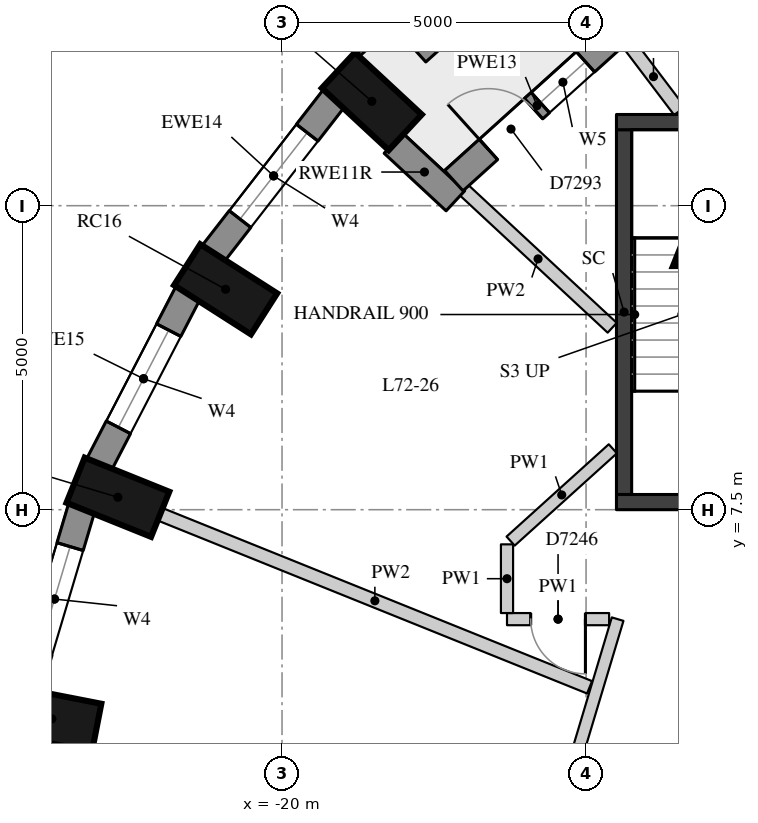
"""IFC4 building model, lengths in metres.
Left out: names, types, materials, properties, quantities, classifications, styles, units other than length and angle.
Written with IfcOpenShell. Run it as: python <this file> out.ifc"""

import sys

from ifc_helpers import new_model, si_unit, direction, frame, frame_2d, origin, origin_2d, place, context, subcontext, project, spatial, rectangle, extrude, element, fill, save


model = new_model("IFC4")
c1 = context("Model", 3, precision=1e-05, world=origin(), true_north=direction((0.0, 1.0)))
c2 = subcontext(c1, "Body", "Model", "MODEL_VIEW")
j1 = project(units=[si_unit("LENGTHUNIT", "METRE"), si_unit("PLANEANGLEUNIT", "RADIAN")], contexts=[c1])
p1 = place(None, origin())
s1 = spatial("IfcSite", under=j1, at=p1, CompositionType="ELEMENT")
p2 = place(p1, origin())
s2 = spatial("IfcBuilding", under=s1, at=p2, CompositionType="ELEMENT")
p3 = place(p2, frame((0.0, 0.0, 253.1)))
s3 = spatial("IfcBuildingStorey", under=s2, at=p3, CompositionType="ELEMENT", Elevation=253.1)
for number, where, z_axis, x_axis in (
    (1, (-18.523, 14.216, 0.0), (0.0, 0.0, 1.0), (-0.733, 0.681, 0.0)),
    (2, (-20.928, 11.125, 0.0), (0.0, 0.0, 1.0), (-0.843, 0.539, 0.0)),
    (3, (-22.7, 7.705, 0.0), (0.0, 0.0, 1.0), (-0.928, 0.374, 0.0)),
    (4, (-23.785, 4.06, 0.0), (0.0, 0.0, 1.0), (-0.981, 0.192, 0.0)),
):
    element("IfcColumn", number, at=place(p3, frame(where, z_axis=z_axis, x_axis=x_axis)), inside=s3, PredefinedType="COLUMN", context=c2, shape_type="SweptSolid", body=[
        extrude(rectangle(XDim=1.5, YDim=0.8, at=origin_2d()), origin(), (0.0, 0.0, 1.0), 3.3),
    ])
p4 = place(p3, frame((-19.142, 14.272, 0.0), z_axis=(0.0, 0.0, 1.0), x_axis=(-0.613862536705, -0.789412937587, 0.0)))
e5 = element("IfcWall", 5, at=p4, inside=s3, PredefinedType="SOLIDWALL", context=c2, shape_type="SweptSolid", body=[
    extrude(rectangle(XDim=3.247, YDim=0.45, at=frame_2d((1.624, 0.0))), origin(), (0.0, 0.0, 1.0), 3.02),
])
p5 = place(p4, frame((0.724, 0.0, 0.4)))
e6 = element("IfcOpeningElement", 6, at=p5, cuts=e5, PredefinedType="OPENING", context=c2, shape_type="SweptSolid", body=[
    extrude(rectangle(XDim=1.8, YDim=1.75, at=frame_2d((0.9, 0.875))), frame((0.0, 0.235, 0.0), z_axis=(0.0, -1.0, 0.0), x_axis=(1.0, 0.0, 0.0)), (0.0, 0.0, 1.0), 0.47),
])
p6 = place(p3, frame((-21.545, 11.068, 0.0), z_axis=(0.0, 0.0, 1.0), x_axis=(-0.459889857669, -0.887975967475, 0.0)))
e7 = element("IfcWall", 7, at=p6, inside=s3, PredefinedType="SOLIDWALL", context=c2, shape_type="SweptSolid", body=[
    extrude(rectangle(XDim=3.186, YDim=0.45, at=frame_2d((1.593, 0.0))), origin(), (0.0, 0.0, 1.0), 3.02),
])
p7 = place(p6, frame((0.693, 0.0, 0.4)))
e8 = element("IfcOpeningElement", 8, at=p7, cuts=e7, PredefinedType="OPENING", context=c2, shape_type="SweptSolid", body=[
    extrude(rectangle(XDim=1.8, YDim=1.75, at=frame_2d((0.9, 0.875))), frame((0.0, 0.235, 0.0), z_axis=(0.0, -1.0, 0.0), x_axis=(1.0, 0.0, 0.0)), (0.0, 0.0, 1.0), 0.47),
])
p8 = place(p3, frame((-23.294, 7.535, 0.0), z_axis=(0.0, 0.0, 1.0), x_axis=(-0.285263800865, -0.958449040855, 0.0)))
e9 = element("IfcWall", 9, at=p8, inside=s3, PredefinedType="SOLIDWALL", context=c2, shape_type="SweptSolid", body=[
    extrude(rectangle(XDim=3.139, YDim=0.45, at=frame_2d((1.57, 0.0))), origin(), (0.0, 0.0, 1.0), 3.02),
])
p9 = place(p8, frame((0.67, 0.0, 0.4)))
e10 = element("IfcOpeningElement", 10, at=p9, cuts=e9, PredefinedType="OPENING", context=c2, shape_type="SweptSolid", body=[
    extrude(rectangle(XDim=1.8, YDim=1.75, at=frame_2d((0.9, 0.875))), frame((0.0, 0.235, 0.0), z_axis=(0.0, -1.0, 0.0), x_axis=(1.0, 0.0, 0.0)), (0.0, 0.0, 1.0), 0.47),
])
p10 = place(p3, frame((-18.167, 13.527, 0.0), z_axis=(0.0, 0.0, 1.0), x_axis=(0.732693451389, -0.680558819127, 0.0)))
e11 = element("IfcWall", 11, at=p10, inside=s3, PredefinedType="SOLIDWALL", context=c2, shape_type="SweptSolid", body=[
    extrude(rectangle(XDim=1.391, YDim=0.45, at=frame_2d((0.695, 0.0))), origin(), (0.0, 0.0, 1.0), 3.02),
])
p11 = place(p3, frame((-14.441, 15.38, 0.0), z_axis=(0.0, 0.0, 1.0), x_axis=(-0.742152631569, -0.670230909057, 0.0)))
e12 = element("IfcWall", 12, at=p11, inside=s3, PredefinedType="SOLIDWALL", context=c2, shape_type="SweptSolid", body=[
    extrude(rectangle(XDim=3.683, YDim=0.45, at=frame_2d((1.842, 0.0))), origin(), (0.0, 0.0, 1.0), 3.02),
])
p12 = place(p11, frame((0.767, 0.0, 0.4)))
e13 = element("IfcOpeningElement", 13, at=p12, cuts=e12, PredefinedType="OPENING", context=c2, shape_type="SweptSolid", body=[
    extrude(rectangle(XDim=1.0, YDim=1.75, at=frame_2d((0.5, 0.875))), frame((0.0, 0.235, 0.0), z_axis=(0.0, -1.0, 0.0), x_axis=(1.0, 0.0, 0.0)), (0.0, 0.0, 1.0), 0.47),
])
p13 = place(p11, frame((1.917, 0.0, 0.0)))
e14 = element("IfcOpeningElement", 14, at=p13, cuts=e12, PredefinedType="OPENING", context=c2, shape_type="SweptSolid", body=[
    extrude(rectangle(XDim=1.0, YDim=2.15, at=frame_2d((0.5, 1.075))), frame((0.0, 0.235, 0.0), z_axis=(0.0, -1.0, 0.0), x_axis=(1.0, 0.0, 0.0)), (0.0, 0.0, 1.0), 0.47),
])
p14 = place(p3, frame((-16.532, 16.328, 0.0), z_axis=(0.0, 0.0, 1.0), x_axis=(-0.743098542319, -0.669182005439, 0.0)))
e15 = element("IfcWall", 15, at=p14, inside=s3, PredefinedType="USERDEFINED", context=c2, shape_type="SweptSolid", body=[
    extrude(rectangle(XDim=1.8, YDim=0.7, at=frame_2d((0.9, 0.0))), origin(), (0.0, 0.0, 1.0), 0.75),
])
p15 = place(p3, frame((-14.375, 7.75, -0.28), z_axis=(0.0, 0.0, 1.0), x_axis=(0.0, 1.0, 0.0)))
e16 = element("IfcWall", 16, at=p15, inside=s3, PredefinedType="SHEAR", context=c2, shape_type="SweptSolid", body=[
    extrude(rectangle(XDim=6.0, YDim=0.25, at=frame_2d((3.0, 0.0))), origin(), (0.0, 0.0, 1.0), 3.3),
])
for number, where, z_axis, x_axis in (
    (17, (-14.5, 13.875, -0.28), (0.0, 0.0, 1.0), (1.0, 0.0, 0.0)),
    (18, (-14.5, 7.625, -0.28), (0.0, 0.0, 1.0), (1.0, 0.0, 0.0)),
):
    element("IfcWall", number, at=place(p3, frame(where, z_axis=z_axis, x_axis=x_axis)), inside=s3, PredefinedType="SHEAR", context=c2, shape_type="SweptSolid", body=[
        extrude(rectangle(XDim=5.2, YDim=0.25, at=frame_2d((2.6, 0.0))), origin(), (0.0, 0.0, 1.0), 3.3),
    ])
p16 = place(p3, frame((-16.071, 0.395, 0.0), z_axis=(0.0, 0.0, 1.0), x_axis=(0.287129472402, 0.957891782029, 0.0)))
e19 = element("IfcWall", 19, at=p16, inside=s3, PredefinedType="PARTITIONING", context=c2, shape_type="SweptSolid", body=[
    extrude(rectangle(XDim=5.538, YDim=0.2, at=frame_2d((2.769, 0.0))), origin(), (0.0, 0.0, 1.0), 2.52),
])
p17 = place(p16, frame((0.543, 0.0, 0.0)))
e20 = element("IfcOpeningElement", 20, at=p17, cuts=e19, PredefinedType="OPENING", context=c2, shape_type="SweptSolid", body=[
    extrude(rectangle(XDim=1.1, YDim=2.1, at=frame_2d((0.55, 1.05))), frame((0.0, 0.11, 0.0), z_axis=(0.0, -1.0, 0.0), x_axis=(1.0, 0.0, 0.0)), (0.0, 0.0, 1.0), 0.22),
])
p18 = place(p3, frame((-14.621, 5.7, 0.0), z_axis=(0.0, 0.0, 1.0), x_axis=(-1.0, 0.0, 0.0)))
e21 = element("IfcWall", 21, at=p18, inside=s3, PredefinedType="PARTITIONING", context=c2, shape_type="SweptSolid", body=[
    extrude(rectangle(XDim=1.679, YDim=0.2, at=frame_2d((0.84, 0.0))), origin(), (0.0, 0.0, 1.0), 3.02),
])
p19 = place(p18, frame((0.39, 0.0, 0.0)))
e22 = element("IfcOpeningElement", 22, at=p19, cuts=e21, PredefinedType="OPENING", context=c2, shape_type="SweptSolid", body=[
    extrude(rectangle(XDim=0.9, YDim=2.1, at=frame_2d((0.45, 1.05))), frame((0.0, 0.11, 0.0), z_axis=(0.0, -1.0, 0.0), x_axis=(1.0, 0.0, 0.0)), (0.0, 0.0, 1.0), 0.22),
])
p20 = place(p3, frame((-16.3, 5.8, 0.0), z_axis=(0.0, 0.0, 1.0), x_axis=(0.0, 1.0, 0.0)))
e23 = element("IfcWall", 23, at=p20, inside=s3, PredefinedType="PARTITIONING", context=c2, shape_type="SweptSolid", body=[
    extrude(rectangle(XDim=1.13, YDim=0.2, at=frame_2d((0.565, 0.0))), origin(), (0.0, 0.0, 1.0), 3.02),
])
p21 = place(p3, frame((-16.24, 6.984, 0.0), z_axis=(0.0, 0.0, 1.0), x_axis=(0.742140692687, 0.67024412885, 0.0)))
e24 = element("IfcWall", 24, at=p21, inside=s3, PredefinedType="PARTITIONING", context=c2, shape_type="SweptSolid", body=[
    extrude(rectangle(XDim=2.265, YDim=0.2, at=frame_2d((1.132, 0.0))), origin(), (0.0, 0.0, 1.0), 3.02),
])
p22 = place(p3, frame((-14.319, 15.187, 0.0), z_axis=(0.0, 0.0, 1.0), x_axis=(0.603937349714, -0.797031792101, 0.0)))
e25 = element("IfcWall", 25, at=p22, inside=s3, PredefinedType="PARTITIONING", context=c2, shape_type="SweptSolid", body=[
    extrude(rectangle(XDim=1.416, YDim=0.22, at=frame_2d((0.708, 0.0))), origin(), (0.0, 0.0, 1.0), 2.57),
])
p23 = place(p3, frame((-17.009, 12.758, 0.0), z_axis=(0.0, 0.0, 1.0), x_axis=(0.732631495403, -0.680625515202, 0.0)))
e26 = element("IfcWall", 26, at=p23, inside=s3, PredefinedType="PARTITIONING", context=c2, shape_type="SweptSolid", body=[
    extrude(rectangle(XDim=3.328, YDim=0.22, at=frame_2d((1.664, 0.0))), origin(), (0.0, 0.0, 1.0), 3.02),
])
p24 = place(p3, frame((-22.004, 7.424, 0.0), z_axis=(0.0, 0.0, 1.0), x_axis=(0.927533826991, -0.373739213607, 0.0)))
e27 = element("IfcWall", 27, at=p24, inside=s3, PredefinedType="PARTITIONING", context=c2, shape_type="SweptSolid", body=[
    extrude(rectangle(XDim=7.614, YDim=0.22, at=frame_2d((3.807, 0.0))), origin(), (0.0, 0.0, 1.0), 3.02),
])
p25 = place(p3, frame((-13.554, 0.0, 0.0), z_axis=(0.0, 0.0, 1.0), x_axis=(0.382730523909, 0.923860025149, 0.0)))
e28 = element("IfcWall", 28, at=p25, inside=s3, PredefinedType="PARTITIONING", context=c2, shape_type="SweptSolid", body=[
    extrude(rectangle(XDim=4.251, YDim=0.1, at=frame_2d((2.125, 0.0))), origin(), (0.0, 0.0, 1.0), 3.02),
])
p26 = place(p5, origin())
e29 = element("IfcWindow", 29, at=p26, inside=s3, PartitioningType="SINGLE_PANEL", PredefinedType="WINDOW", context=c2, shape_type="SweptSolid", body=[
    extrude(rectangle(XDim=1.8, YDim=1.75, at=frame_2d((0.9, 0.875))), frame((0.0, 0.035, 0.0), z_axis=(0.0, -1.0, 0.0), x_axis=(1.0, 0.0, 0.0)), (0.0, 0.0, 1.0), 0.06),
])
fill(e6, e29)
p27 = place(p7, origin())
e30 = element("IfcWindow", 30, at=p27, inside=s3, PartitioningType="SINGLE_PANEL", PredefinedType="WINDOW", context=c2, shape_type="SweptSolid", body=[
    extrude(rectangle(XDim=1.8, YDim=1.75, at=frame_2d((0.9, 0.875))), frame((0.0, 0.035, 0.0), z_axis=(0.0, -1.0, 0.0), x_axis=(1.0, 0.0, 0.0)), (0.0, 0.0, 1.0), 0.06),
])
fill(e8, e30)
p28 = place(p9, origin())
e31 = element("IfcWindow", 31, at=p28, inside=s3, PartitioningType="SINGLE_PANEL", PredefinedType="WINDOW", context=c2, shape_type="SweptSolid", body=[
    extrude(rectangle(XDim=1.8, YDim=1.75, at=frame_2d((0.9, 0.875))), frame((0.0, 0.035, 0.0), z_axis=(0.0, -1.0, 0.0), x_axis=(1.0, 0.0, 0.0)), (0.0, 0.0, 1.0), 0.06),
])
fill(e10, e31)
p29 = place(p12, origin())
e32 = element("IfcWindow", 32, at=p29, inside=s3, PartitioningType="SINGLE_PANEL", PredefinedType="WINDOW", context=c2, shape_type="SweptSolid", body=[
    extrude(rectangle(XDim=1.0, YDim=1.75, at=frame_2d((0.5, 0.875))), frame((0.0, 0.035, 0.0), z_axis=(0.0, -1.0, 0.0), x_axis=(1.0, 0.0, 0.0)), (0.0, 0.0, 1.0), 0.06),
])
fill(e13, e32)
p30 = place(p13, origin())
e33 = element("IfcDoor", 33, at=p30, inside=s3, OperationType="SINGLE_SWING_LEFT", PredefinedType="DOOR", context=c2, shape_type="SweptSolid", body=[
    extrude(rectangle(XDim=1.0, YDim=2.15, at=frame_2d((0.5, 1.075))), frame((0.0, -0.025, 0.0), z_axis=(0.0, -1.0, 0.0), x_axis=(1.0, 0.0, 0.0)), (0.0, 0.0, 1.0), 0.05),
])
fill(e14, e33)
p31 = place(p19, origin())
e34 = element("IfcDoor", 34, at=p31, inside=s3, OperationType="SINGLE_SWING_LEFT", PredefinedType="DOOR", context=c2, shape_type="SweptSolid", body=[
    extrude(rectangle(XDim=0.9, YDim=2.1, at=frame_2d((0.45, 1.05))), frame((0.0, 0.025, 0.0), z_axis=(0.0, -1.0, 0.0), x_axis=(1.0, 0.0, 0.0)), (0.0, 0.0, 1.0), 0.05),
])
fill(e22, e34)
save(model, sys.argv[1])
